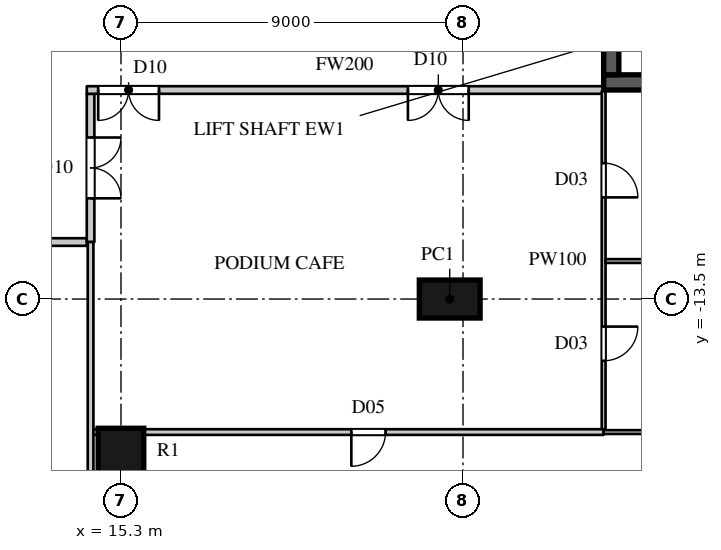
"""IFC4 building model, lengths in metres.
Left out: names, types, materials, properties, quantities, classifications, styles, units other than length and angle.
Written with IfcOpenShell. Run it as: python <this file> out.ifc"""

import sys

from ifc_helpers import new_model, si_unit, direction, frame, frame_2d, origin, origin_2d, place, context, subcontext, project, spatial, rectangle, circle, extrude, element, fill, save


model = new_model("IFC4")
c1 = context("Model", 3, precision=1e-05, world=origin(), true_north=direction((0.0, 1.0)))
c2 = subcontext(c1, "Body", "Model", "MODEL_VIEW")
j1 = project(units=[si_unit("LENGTHUNIT", "METRE"), si_unit("PLANEANGLEUNIT", "RADIAN")], contexts=[c1])
p1 = place(None, origin())
s1 = spatial("IfcSite", under=j1, at=p1, CompositionType="ELEMENT")
p2 = place(p1, origin())
s2 = spatial("IfcBuilding", under=s1, at=p2, CompositionType="ELEMENT")
p3 = place(p2, frame((0.0, 0.0, 44.0)))
s3 = spatial("IfcBuildingStorey", under=s2, at=p3, CompositionType="ELEMENT", Elevation=44.0)
p4 = place(p3, frame((23.95, -13.5, 0.0), z_axis=(0.0, 0.0, 1.0), x_axis=(0.0, 1.0, 0.0)))
e1 = element("IfcColumn", 1, at=p4, inside=s3, PredefinedType="COLUMN", context=c2, shape_type="SweptSolid", body=[
    extrude(rectangle(XDim=1.0, YDim=1.6, at=origin_2d()), origin(), (0.0, 0.0, 1.0), 6.0),
])
p5 = place(p3, frame((15.3, -17.5, 0.0), z_axis=(0.0, 0.0, 1.0), x_axis=(1.0, 0.0, 0.0)))
e2 = element("IfcColumn", 2, at=p5, inside=s3, PredefinedType="COLUMN", context=c2, shape_type="SweptSolid", body=[
    extrude(circle(Radius=0.6, at=origin_2d()), origin(), (0.0, 0.0, 1.0), 6.0),
])
p6 = place(p3, frame((28.0, -7.8, 0.0), z_axis=(0.0, 0.0, 1.0), x_axis=(1.0, 0.0, 0.0)))
e3 = element("IfcWall", 3, at=p6, inside=s3, PredefinedType="SHEAR", context=c2, shape_type="SweptSolid", body=[
    extrude(rectangle(XDim=10.0, YDim=0.4, at=frame_2d((5.0, 0.0))), origin(), (0.0, 0.0, 1.0), 6.0),
])
p7 = place(p3, frame((28.2, -7.6, 0.0), z_axis=(0.0, 0.0, 1.0), x_axis=(0.0, 1.0, 0.0)))
e4 = element("IfcWall", 4, at=p7, inside=s3, PredefinedType="SHEAR", context=c2, shape_type="SweptSolid", body=[
    extrude(rectangle(XDim=15.2, YDim=0.4, at=frame_2d((7.6, 0.0))), origin(), (0.0, 0.0, 1.0), 6.0),
])
p8 = place(p7, frame((4.05, 0.0, 0.0)))
e5 = element("IfcOpeningElement", 5, at=p8, cuts=e4, PredefinedType="OPENING", context=c2, shape_type="SweptSolid", body=[
    extrude(rectangle(XDim=1.5, YDim=2.4, at=frame_2d((0.75, 1.2))), frame((0.0, 0.21, 0.0), z_axis=(0.0, -1.0, 0.0), x_axis=(1.0, 0.0, 0.0)), (0.0, 0.0, 1.0), 0.42),
])
p9 = place(p7, frame((6.95, 0.0, 0.0)))
e6 = element("IfcOpeningElement", 6, at=p9, cuts=e4, PredefinedType="OPENING", context=c2, shape_type="SweptSolid", body=[
    extrude(rectangle(XDim=1.5, YDim=2.4, at=frame_2d((0.75, 1.2))), frame((0.0, 0.21, 0.0), z_axis=(0.0, -1.0, 0.0), x_axis=(1.0, 0.0, 0.0)), (0.0, 0.0, 1.0), 0.42),
])
p10 = place(p3, frame((-10.4, -12.0, 0.0), z_axis=(0.0, 0.0, 1.0), x_axis=(1.0, 0.0, 0.0)))
e7 = element("IfcWall", 7, at=p10, inside=s3, PredefinedType="PARTITIONING", context=c2, shape_type="SweptSolid", body=[
    extrude(rectangle(XDim=24.8, YDim=0.2, at=frame_2d((12.4, 0.0))), origin(), (0.0, 0.0, 1.0), 5.596),
])
p11 = place(p10, frame((3.3, 0.0, 0.0)))
e8 = element("IfcOpeningElement", 8, at=p11, cuts=e7, PredefinedType="OPENING", context=c2, shape_type="SweptSolid", body=[
    extrude(rectangle(XDim=0.95, YDim=2.2, at=frame_2d((0.475, 1.1))), frame((0.0, 0.11, 0.0), z_axis=(0.0, -1.0, 0.0), x_axis=(1.0, 0.0, 0.0)), (0.0, 0.0, 1.0), 0.22),
])
p12 = place(p10, frame((11.4, 0.0, 0.0)))
e9 = element("IfcOpeningElement", 9, at=p12, cuts=e7, PredefinedType="OPENING", context=c2, shape_type="SweptSolid", body=[
    extrude(rectangle(XDim=0.95, YDim=2.2, at=frame_2d((0.475, 1.1))), frame((0.0, 0.11, 0.0), z_axis=(0.0, -1.0, 0.0), x_axis=(1.0, 0.0, 0.0)), (0.0, 0.0, 1.0), 0.22),
])
p13 = place(p10, frame((20.05, 0.0, 0.0)))
e10 = element("IfcOpeningElement", 10, at=p13, cuts=e7, PredefinedType="OPENING", context=c2, shape_type="SweptSolid", body=[
    extrude(rectangle(XDim=0.95, YDim=2.2, at=frame_2d((0.475, 1.1))), frame((0.0, 0.11, 0.0), z_axis=(0.0, -1.0, 0.0), x_axis=(1.0, 0.0, 0.0)), (0.0, 0.0, 1.0), 0.22),
])
p14 = place(p3, frame((14.5, -12.0, 0.0), z_axis=(0.0, 0.0, 1.0), x_axis=(0.0, 1.0, 0.0)))
e11 = element("IfcWall", 11, at=p14, inside=s3, PredefinedType="PARTITIONING", context=c2, shape_type="SweptSolid", body=[
    extrude(rectangle(XDim=3.9, YDim=0.2, at=frame_2d((1.95, 0.0))), origin(), (0.0, 0.0, 1.0), 5.596),
])
p15 = place(p14, frame((1.15, 0.0, 0.0)))
e12 = element("IfcOpeningElement", 12, at=p15, cuts=e11, PredefinedType="OPENING", context=c2, shape_type="SweptSolid", body=[
    extrude(rectangle(XDim=1.6, YDim=2.4, at=frame_2d((0.8, 1.2))), frame((0.0, 0.11, 0.0), z_axis=(0.0, -1.0, 0.0), x_axis=(1.0, 0.0, 0.0)), (0.0, 0.0, 1.0), 0.22),
])
p16 = place(p3, frame((14.4, -8.0, 0.0), z_axis=(0.0, 0.0, 1.0), x_axis=(1.0, 0.0, 0.0)))
e13 = element("IfcWall", 13, at=p16, inside=s3, PredefinedType="PARTITIONING", context=c2, shape_type="SweptSolid", body=[
    extrude(rectangle(XDim=13.57, YDim=0.2, at=frame_2d((6.785, 0.0))), origin(), (0.0, 0.0, 1.0), 5.596),
])
p17 = place(p16, frame((8.45, 0.0, 0.0)))
e14 = element("IfcOpeningElement", 14, at=p17, cuts=e13, PredefinedType="OPENING", context=c2, shape_type="SweptSolid", body=[
    extrude(rectangle(XDim=1.6, YDim=2.4, at=frame_2d((0.8, 1.2))), frame((0.0, 0.11, 0.0), z_axis=(0.0, -1.0, 0.0), x_axis=(1.0, 0.0, 0.0)), (0.0, 0.0, 1.0), 0.22),
])
p18 = place(p16, frame((0.3, 0.0, 0.0)))
e15 = element("IfcOpeningElement", 15, at=p18, cuts=e13, PredefinedType="OPENING", context=c2, shape_type="SweptSolid", body=[
    extrude(rectangle(XDim=1.6, YDim=2.4, at=frame_2d((0.8, 1.2))), frame((0.0, 0.11, 0.0), z_axis=(0.0, -1.0, 0.0), x_axis=(1.0, 0.0, 0.0)), (0.0, 0.0, 1.0), 0.22),
])
p19 = place(p3, frame((14.5, -27.125, 0.0), z_axis=(0.0, 0.0, 1.0), x_axis=(0.0, 1.0, 0.0)))
e16 = element("IfcWall", 16, at=p19, inside=s3, PredefinedType="PARTITIONING", context=c2, shape_type="SweptSolid", body=[
    extrude(rectangle(XDim=15.125, YDim=0.15, at=frame_2d((7.562, 0.0))), origin(), (0.0, 0.0, 1.0), 5.596),
])
p20 = place(p3, frame((14.575, -17.0, 0.0), z_axis=(0.0, 0.0, 1.0), x_axis=(1.0, 0.0, 0.0)))
e17 = element("IfcWall", 17, at=p20, inside=s3, PredefinedType="PARTITIONING", context=c2, shape_type="SweptSolid", body=[
    extrude(rectangle(XDim=0.314, YDim=0.15, at=frame_2d((0.157, 0.0))), origin(), (0.0, 0.0, 1.0), 5.596),
])
p21 = place(p3, frame((15.711, -17.0, 0.0), z_axis=(0.0, 0.0, 1.0), x_axis=(1.0, 0.0, 0.0)))
e18 = element("IfcWall", 18, at=p21, inside=s3, PredefinedType="PARTITIONING", context=c2, shape_type="SweptSolid", body=[
    extrude(rectangle(XDim=12.289, YDim=0.15, at=frame_2d((6.145, 0.0))), origin(), (0.0, 0.0, 1.0), 5.596),
])
p22 = place(p21, frame((5.65, 0.0, 0.0)))
e19 = element("IfcOpeningElement", 19, at=p22, cuts=e18, PredefinedType="OPENING", context=c2, shape_type="SweptSolid", body=[
    extrude(rectangle(XDim=0.9, YDim=2.2, at=frame_2d((0.45, 1.1))), frame((0.0, 0.085, 0.0), z_axis=(0.0, -1.0, 0.0), x_axis=(1.0, 0.0, 0.0)), (0.0, 0.0, 1.0), 0.17),
])
p23 = place(p3, frame((28.0, -17.0, 0.0), z_axis=(0.0, 0.0, 1.0), x_axis=(1.0, 0.0, 0.0)))
e20 = element("IfcWall", 20, at=p23, inside=s3, PredefinedType="PARTITIONING", context=c2, shape_type="SweptSolid", body=[
    extrude(rectangle(XDim=5.95, YDim=0.1, at=frame_2d((2.975, 0.0))), origin(), (0.0, 0.0, 1.0), 5.596),
])
p24 = place(p3, frame((28.0, -16.925, 0.0), z_axis=(0.0, 0.0, 1.0), x_axis=(0.0, 1.0, 0.0)))
e21 = element("IfcWall", 21, at=p24, inside=s3, PredefinedType="PARTITIONING", context=c2, shape_type="SweptSolid", body=[
    extrude(rectangle(XDim=8.895, YDim=0.1, at=frame_2d((4.448, 0.0))), origin(), (0.0, 0.0, 1.0), 5.596),
])
p25 = place(p24, frame((6.1, 0.0, 0.0)))
e22 = element("IfcOpeningElement", 22, at=p25, cuts=e21, PredefinedType="OPENING", context=c2, shape_type="SweptSolid", body=[
    extrude(rectangle(XDim=0.9, YDim=2.2, at=frame_2d((0.45, 1.1))), frame((0.0, 0.06, 0.0), z_axis=(0.0, -1.0, 0.0), x_axis=(1.0, 0.0, 0.0)), (0.0, 0.0, 1.0), 0.12),
])
p26 = place(p24, frame((1.8, 0.0, 0.0)))
e23 = element("IfcOpeningElement", 23, at=p26, cuts=e21, PredefinedType="OPENING", context=c2, shape_type="SweptSolid", body=[
    extrude(rectangle(XDim=0.9, YDim=2.2, at=frame_2d((0.45, 1.1))), frame((0.0, 0.06, 0.0), z_axis=(0.0, -1.0, 0.0), x_axis=(1.0, 0.0, 0.0)), (0.0, 0.0, 1.0), 0.12),
])
p27 = place(p3, frame((28.05, -12.5, 0.0), z_axis=(0.0, 0.0, 1.0), x_axis=(1.0, 0.0, 0.0)))
e24 = element("IfcWall", 24, at=p27, inside=s3, PredefinedType="PARTITIONING", context=c2, shape_type="SweptSolid", body=[
    extrude(rectangle(XDim=5.8, YDim=0.1, at=frame_2d((2.9, 0.0))), origin(), (0.0, 0.0, 1.0), 5.596),
])
p28 = place(p15, origin())
e25 = element("IfcDoor", 25, at=p28, inside=s3, OperationType="DOUBLE_DOOR_SINGLE_SWING", PredefinedType="DOOR", context=c2, shape_type="SweptSolid", body=[
    extrude(rectangle(XDim=1.6, YDim=2.4, at=frame_2d((0.8, 1.2))), frame((0.0, 0.025, 0.0), z_axis=(0.0, -1.0, 0.0), x_axis=(1.0, 0.0, 0.0)), (0.0, 0.0, 1.0), 0.05),
])
fill(e12, e25)
p29 = place(p17, origin())
e26 = element("IfcDoor", 26, at=p29, inside=s3, OperationType="DOUBLE_DOOR_SINGLE_SWING", PredefinedType="DOOR", context=c2, shape_type="SweptSolid", body=[
    extrude(rectangle(XDim=1.6, YDim=2.4, at=frame_2d((0.8, 1.2))), frame((0.0, 0.025, 0.0), z_axis=(0.0, -1.0, 0.0), x_axis=(1.0, 0.0, 0.0)), (0.0, 0.0, 1.0), 0.05),
])
fill(e14, e26)
p30 = place(p18, origin())
e27 = element("IfcDoor", 27, at=p30, inside=s3, OperationType="DOUBLE_DOOR_SINGLE_SWING", PredefinedType="DOOR", context=c2, shape_type="SweptSolid", body=[
    extrude(rectangle(XDim=1.6, YDim=2.4, at=frame_2d((0.8, 1.2))), frame((0.0, 0.025, 0.0), z_axis=(0.0, -1.0, 0.0), x_axis=(1.0, 0.0, 0.0)), (0.0, 0.0, 1.0), 0.05),
])
fill(e15, e27)
p31 = place(p25, origin())
e28 = element("IfcDoor", 28, at=p31, inside=s3, OperationType="SINGLE_SWING_RIGHT", PredefinedType="DOOR", context=c2, shape_type="SweptSolid", body=[
    extrude(rectangle(XDim=0.9, YDim=2.2, at=frame_2d((0.45, 1.1))), frame((0.0, 0.025, 0.0), z_axis=(0.0, -1.0, 0.0), x_axis=(1.0, 0.0, 0.0)), (0.0, 0.0, 1.0), 0.05),
])
fill(e22, e28)
p32 = place(p26, origin())
e29 = element("IfcDoor", 29, at=p32, inside=s3, OperationType="SINGLE_SWING_LEFT", PredefinedType="DOOR", context=c2, shape_type="SweptSolid", body=[
    extrude(rectangle(XDim=0.9, YDim=2.2, at=frame_2d((0.45, 1.1))), frame((0.0, 0.025, 0.0), z_axis=(0.0, -1.0, 0.0), x_axis=(1.0, 0.0, 0.0)), (0.0, 0.0, 1.0), 0.05),
])
fill(e23, e29)
p33 = place(p22, origin())
e30 = element("IfcDoor", 30, at=p33, inside=s3, OperationType="SINGLE_SWING_RIGHT", PredefinedType="DOOR", context=c2, shape_type="SweptSolid", body=[
    extrude(rectangle(XDim=0.9, YDim=2.2, at=frame_2d((0.45, 1.1))), frame((0.0, 0.025, 0.0), z_axis=(0.0, -1.0, 0.0), x_axis=(1.0, 0.0, 0.0)), (0.0, 0.0, 1.0), 0.05),
])
fill(e19, e30)
save(model, sys.argv[1])
